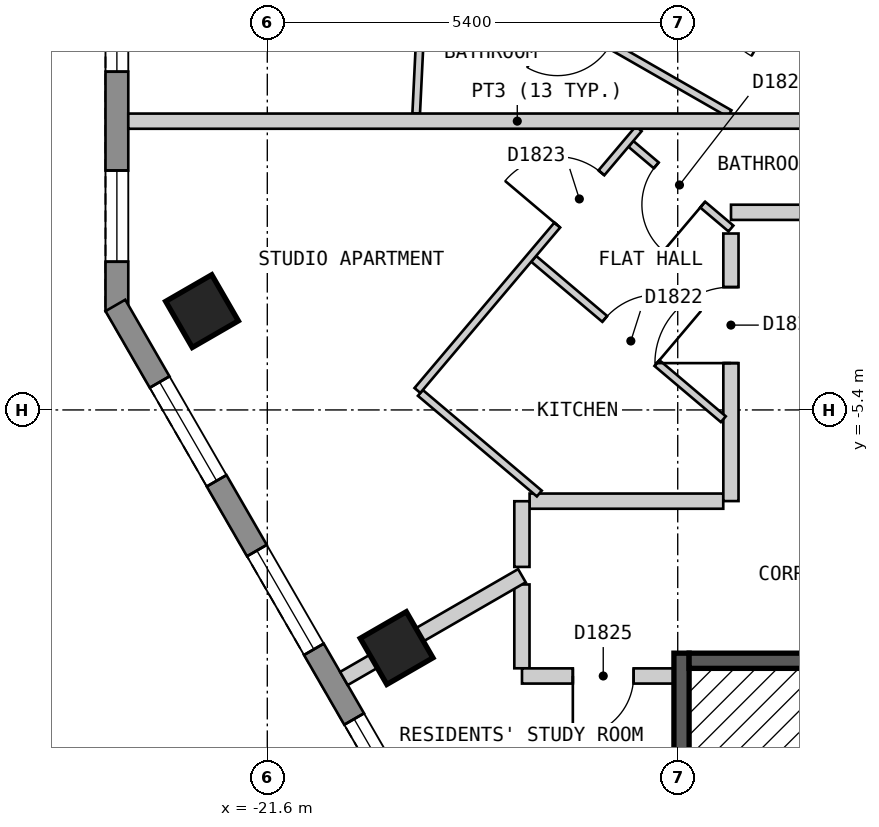
"""IFC4 building model, lengths in metres.
Left out: names, types, materials, properties, quantities, classifications, styles, units other than length and angle.
Written with IfcOpenShell. Run it as: python <this file> out.ifc"""

import sys

from ifc_helpers import new_model, si_unit, direction, frame, frame_2d, origin, origin_2d, place, context, subcontext, project, spatial, polyline, rectangle, outline, extrude, element, fill, save


model = new_model("IFC4")
c1 = context("Model", 3, precision=1e-05, world=origin(), true_north=direction((0.0, 1.0)))
c2 = subcontext(c1, "Body", "Model", "MODEL_VIEW")
j1 = project(units=[si_unit("LENGTHUNIT", "METRE"), si_unit("PLANEANGLEUNIT", "RADIAN")], contexts=[c1])
p1 = place(None, origin())
s1 = spatial("IfcSite", under=j1, at=p1, CompositionType="ELEMENT")
p2 = place(p1, origin())
s2 = spatial("IfcBuilding", under=s1, at=p2, CompositionType="ELEMENT")
p3 = place(p2, frame((0.0, 0.0, 208.8)))
s3 = spatial("IfcBuildingStorey", under=s2, at=p3, CompositionType="ELEMENT", Elevation=208.8)
for number, where, z_axis, x_axis in (
    (1, (-22.459, -4.1, 0.0), (0.0, 0.0, 1.0), (0.5, -0.866, 0.0)),
    (2, (-19.899, -8.533, 0.0), (0.0, 0.0, 1.0), (0.5, -0.866, 0.0)),
):
    element("IfcColumn", number, at=place(p3, frame(where, z_axis=z_axis, x_axis=x_axis)), inside=s3, PredefinedType="COLUMN", context=c2, shape_type="SweptSolid", body=[
        extrude(rectangle(XDim=0.7, YDim=0.7, at=origin_2d()), origin(), (0.0, 0.0, 1.0), 3.0),
    ])
p4 = place(p3, frame((-23.579, 0.9, 0.0), z_axis=(0.0, 0.0, 1.0), x_axis=(0.0, -1.0, 0.0)))
e3 = element("IfcWall", 3, at=p4, inside=s3, PredefinedType="SOLIDWALL", context=c2, shape_type="SweptSolid", body=[
    extrude(outline(polyline([(0.0, -0.15), (5.0, -0.15), (4.92, 0.15), (0.08, 0.15), (0.0, -0.15)])), origin(), (0.0, 0.0, 1.0), 2.7),
])
p5 = place(p4, frame((0.65, 0.0, 0.15)))
e4 = element("IfcOpeningElement", 4, at=p5, cuts=e3, PredefinedType="OPENING", context=c2, shape_type="SweptSolid", body=[
    extrude(rectangle(XDim=1.2, YDim=2.1, at=frame_2d((0.6, 1.05))), frame((0.0, 0.16, 0.0), z_axis=(0.0, -1.0, 0.0), x_axis=(1.0, 0.0, 0.0)), (0.0, 0.0, 1.0), 0.32),
])
p6 = place(p4, frame((3.15, 0.0, 0.15)))
e5 = element("IfcOpeningElement", 5, at=p6, cuts=e3, PredefinedType="OPENING", context=c2, shape_type="SweptSolid", body=[
    extrude(rectangle(XDim=1.2, YDim=2.1, at=frame_2d((0.6, 1.05))), frame((0.0, 0.16, 0.0), z_axis=(0.0, -1.0, 0.0), x_axis=(1.0, 0.0, 0.0)), (0.0, 0.0, 1.0), 0.32),
])
p7 = place(p3, frame((-23.599, -4.025, 0.0), z_axis=(0.0, 0.0, 1.0), x_axis=(0.500012653391, -0.866018098222, 0.0)))
e6 = element("IfcWall", 6, at=p7, inside=s3, PredefinedType="SOLIDWALL", context=c2, shape_type="SweptSolid", body=[
    extrude(outline(polyline([(0.0, -0.15), (16.628, -0.15), (16.548, 0.15), (0.08, 0.15), (0.0, -0.15)])), origin(), (0.0, 0.0, 1.0), 2.7),
])
p8 = place(p7, frame((1.164, 0.0, 0.15)))
e7 = element("IfcOpeningElement", 7, at=p8, cuts=e6, PredefinedType="OPENING", context=c2, shape_type="SweptSolid", body=[
    extrude(rectangle(XDim=1.5, YDim=2.1, at=frame_2d((0.75, 1.05))), frame((0.0, 0.16, 0.0), z_axis=(0.0, -1.0, 0.0), x_axis=(1.0, 0.0, 0.0)), (0.0, 0.0, 1.0), 0.32),
])
p9 = place(p7, frame((3.724, 0.0, 0.15)))
e8 = element("IfcOpeningElement", 8, at=p9, cuts=e6, PredefinedType="OPENING", context=c2, shape_type="SweptSolid", body=[
    extrude(rectangle(XDim=1.5, YDim=2.1, at=frame_2d((0.75, 1.05))), frame((0.0, 0.16, 0.0), z_axis=(0.0, -1.0, 0.0), x_axis=(1.0, 0.0, 0.0)), (0.0, 0.0, 1.0), 0.32),
])
p10 = place(p7, frame((6.283, 0.0, 0.15)))
e9 = element("IfcOpeningElement", 9, at=p10, cuts=e6, PredefinedType="OPENING", context=c2, shape_type="SweptSolid", body=[
    extrude(rectangle(XDim=1.5, YDim=2.1, at=frame_2d((0.75, 1.05))), frame((0.0, 0.16, 0.0), z_axis=(0.0, -1.0, 0.0), x_axis=(1.0, 0.0, 0.0)), (0.0, 0.0, 1.0), 0.32),
])
p11 = place(p7, frame((8.843, 0.0, 0.15)))
e10 = element("IfcOpeningElement", 10, at=p11, cuts=e6, PredefinedType="OPENING", context=c2, shape_type="SweptSolid", body=[
    extrude(rectangle(XDim=1.5, YDim=2.1, at=frame_2d((0.75, 1.05))), frame((0.0, 0.16, 0.0), z_axis=(0.0, -1.0, 0.0), x_axis=(1.0, 0.0, 0.0)), (0.0, 0.0, 1.0), 0.32),
])
p12 = place(p7, frame((11.403, 0.0, 0.15)))
e11 = element("IfcOpeningElement", 11, at=p12, cuts=e6, PredefinedType="OPENING", context=c2, shape_type="SweptSolid", body=[
    extrude(rectangle(XDim=1.5, YDim=2.1, at=frame_2d((0.75, 1.05))), frame((0.0, 0.16, 0.0), z_axis=(0.0, -1.0, 0.0), x_axis=(1.0, 0.0, 0.0)), (0.0, 0.0, 1.0), 0.32),
])
p13 = place(p7, frame((13.962, 0.0, 0.15)))
e12 = element("IfcOpeningElement", 12, at=p13, cuts=e6, PredefinedType="OPENING", context=c2, shape_type="SweptSolid", body=[
    extrude(rectangle(XDim=1.5, YDim=2.1, at=frame_2d((0.75, 1.05))), frame((0.0, 0.16, 0.0), z_axis=(0.0, -1.0, 0.0), x_axis=(1.0, 0.0, 0.0)), (0.0, 0.0, 1.0), 0.32),
])
p14 = place(p3, frame((-18.25, -7.696, 0.0), z_axis=(0.0, 0.0, 1.0), x_axis=(0.0, -1.0, 0.0)))
e13 = element("IfcWall", 13, at=p14, inside=s3, PredefinedType="PARTITIONING", context=c2, shape_type="SweptSolid", body=[
    extrude(rectangle(XDim=1.103, YDim=0.2, at=frame_2d((0.552, 0.0))), origin(), (0.0, 0.0, 1.0), 2.7),
])
p15 = place(p3, frame((-18.149, -6.6, 0.0), z_axis=(0.0, 0.0, 1.0), x_axis=(1.0, 0.0, 0.0)))
e14 = element("IfcWall", 14, at=p15, inside=s3, PredefinedType="PARTITIONING", context=c2, shape_type="SweptSolid", body=[
    extrude(rectangle(XDim=2.548, YDim=0.2, at=frame_2d((1.274, 0.0))), origin(), (0.0, 0.0, 1.0), 2.7),
])
p16 = place(p3, frame((-18.249, -8.9, 0.0), z_axis=(0.0, 0.0, 1.0), x_axis=(1.0, 0.0, 0.0)))
e15 = element("IfcWall", 15, at=p16, inside=s3, PredefinedType="PARTITIONING", context=c2, shape_type="SweptSolid", body=[
    extrude(rectangle(XDim=2.199, YDim=0.2, at=frame_2d((1.1, 0.0))), origin(), (0.0, 0.0, 1.0), 2.7),
])
p17 = place(p16, frame((0.669, 0.0, 0.0)))
e16 = element("IfcOpeningElement", 16, at=p17, cuts=e15, PredefinedType="OPENING", context=c2, shape_type="SweptSolid", body=[
    extrude(rectangle(XDim=0.8, YDim=2.1, at=frame_2d((0.4, 1.05))), frame((0.0, 0.11, 0.0), z_axis=(0.0, -1.0, 0.0), x_axis=(1.0, 0.0, 0.0)), (0.0, 0.0, 1.0), 0.22),
])
p18 = place(p3, frame((-15.499, -2.8, 0.0), z_axis=(0.0, 0.0, 1.0), x_axis=(1.0, 0.0, 0.0)))
e17 = element("IfcWall", 17, at=p18, inside=s3, PredefinedType="PARTITIONING", context=c2, shape_type="SweptSolid", body=[
    extrude(rectangle(XDim=2.025, YDim=0.2, at=frame_2d((1.012, 0.0))), origin(), (0.0, 0.0, 1.0), 2.7),
])
p19 = place(p3, frame((-15.5, -6.599, 0.0), z_axis=(0.0, 0.0, 1.0), x_axis=(0.0, 1.0, 0.0)))
e18 = element("IfcWall", 18, at=p19, inside=s3, PredefinedType="PARTITIONING", context=c2, shape_type="SweptSolid", body=[
    extrude(rectangle(XDim=3.52, YDim=0.2, at=frame_2d((1.76, 0.0))), origin(), (0.0, 0.0, 1.0), 2.7),
])
p20 = place(p19, frame((1.815, 0.0, 0.0)))
e19 = element("IfcOpeningElement", 19, at=p20, cuts=e18, PredefinedType="OPENING", context=c2, shape_type="SweptSolid", body=[
    extrude(rectangle(XDim=1.0, YDim=2.1, at=frame_2d((0.5, 1.05))), frame((0.0, 0.11, 0.0), z_axis=(0.0, -1.0, 0.0), x_axis=(1.0, 0.0, 0.0)), (0.0, 0.0, 1.0), 0.22),
])
p21 = place(p3, frame((-18.25, -7.465, 0.0), z_axis=(0.0, 0.0, 1.0), x_axis=(0.0, 1.0, 0.0)))
e20 = element("IfcWall", 20, at=p21, inside=s3, PredefinedType="PARTITIONING", context=c2, shape_type="SweptSolid", body=[
    extrude(rectangle(XDim=0.864, YDim=0.2, at=frame_2d((0.432, 0.0))), origin(), (0.0, 0.0, 1.0), 2.7),
])
p22 = place(p3, frame((-17.441, 1.562, 0.0), z_axis=(0.0, 0.0, 1.0), x_axis=(0.867419073464, -0.497578286293, 0.0)))
e21 = element("IfcWall", 21, at=p22, inside=s3, PredefinedType="PARTITIONING", context=c2, shape_type="SweptSolid", body=[
    extrude(rectangle(XDim=5.185, YDim=0.1, at=frame_2d((2.593, 0.0))), origin(), (0.0, 0.0, 1.0), 2.7),
])
p23 = place(p22, frame((2.165, 0.0, 0.0)))
e22 = element("IfcOpeningElement", 22, at=p23, cuts=e21, PredefinedType="OPENING", context=c2, shape_type="SweptSolid", body=[
    extrude(rectangle(XDim=0.9, YDim=2.1, at=frame_2d((0.45, 1.05))), frame((0.0, 0.06, 0.0), z_axis=(0.0, -1.0, 0.0), x_axis=(1.0, 0.0, 0.0)), (0.0, 0.0, 1.0), 0.12),
])
p24 = place(p3, frame((-19.48, 0.771, 0.0), z_axis=(0.0, 0.0, 1.0), x_axis=(0.86748552317, -0.497462427817, 0.0)))
e23 = element("IfcWall", 23, at=p24, inside=s3, PredefinedType="PARTITIONING", context=c2, shape_type="SweptSolid", body=[
    extrude(rectangle(XDim=4.567, YDim=0.1, at=frame_2d((2.284, 0.0))), origin(), (0.0, 0.0, 1.0), 2.7),
])
p25 = place(p24, frame((1.956, 0.0, 0.0)))
e24 = element("IfcOpeningElement", 24, at=p25, cuts=e23, PredefinedType="OPENING", context=c2, shape_type="SweptSolid", body=[
    extrude(rectangle(XDim=0.8, YDim=2.1, at=frame_2d((0.4, 1.05))), frame((0.0, 0.06, 0.0), z_axis=(0.0, -1.0, 0.0), x_axis=(1.0, 0.0, 0.0)), (0.0, 0.0, 1.0), 0.12),
])
p26 = place(p3, frame((-16.816, -1.9, 0.0), z_axis=(0.0, 0.0, 1.0), x_axis=(0.763509851459, -0.645796180482, 0.0)))
e25 = element("IfcWall", 25, at=p26, inside=s3, PredefinedType="PARTITIONING", context=c2, shape_type="SweptSolid", body=[
    extrude(rectangle(XDim=1.724, YDim=0.1, at=frame_2d((0.862, 0.0))), origin(), (0.0, 0.0, 1.0), 2.7),
])
p27 = place(p26, frame((0.437, 0.0, 0.0)))
e26 = element("IfcOpeningElement", 26, at=p27, cuts=e25, PredefinedType="OPENING", context=c2, shape_type="SweptSolid", body=[
    extrude(rectangle(XDim=0.8, YDim=2.1, at=frame_2d((0.4, 1.05))), frame((0.0, 0.06, 0.0), z_axis=(0.0, -1.0, 0.0), x_axis=(1.0, 0.0, 0.0)), (0.0, 0.0, 1.0), 0.12),
])
p28 = place(p3, frame((-18.095, -3.412, 0.0), z_axis=(0.0, 0.0, 1.0), x_axis=(0.763564811502, -0.645731196889, 0.0)))
e27 = element("IfcWall", 27, at=p28, inside=s3, PredefinedType="PARTITIONING", context=c2, shape_type="SweptSolid", body=[
    extrude(rectangle(XDim=3.267, YDim=0.1, at=frame_2d((1.634, 0.0))), origin(), (0.0, 0.0, 1.0), 2.7),
])
p29 = place(p28, frame((1.224, 0.0, 0.0)))
e28 = element("IfcOpeningElement", 28, at=p29, cuts=e27, PredefinedType="OPENING", context=c2, shape_type="SweptSolid", body=[
    extrude(rectangle(XDim=0.9, YDim=2.1, at=frame_2d((0.45, 1.05))), frame((0.0, 0.06, 0.0), z_axis=(0.0, -1.0, 0.0), x_axis=(1.0, 0.0, 0.0)), (0.0, 0.0, 1.0), 0.12),
])
p30 = place(p3, frame((-19.586, -5.176, 0.0), z_axis=(0.0, 0.0, 1.0), x_axis=(0.763435976882, -0.645883510551, 0.0)))
e29 = element("IfcWall", 29, at=p30, inside=s3, PredefinedType="PARTITIONING", context=c2, shape_type="SweptSolid", body=[
    extrude(rectangle(XDim=2.05, YDim=0.1, at=frame_2d((1.025, 0.0))), origin(), (0.0, 0.0, 1.0), 2.7),
])
p31 = place(p3, frame((-19.625, -5.144, 0.0), z_axis=(0.0, 0.0, 1.0), x_axis=(0.645668001073, 0.763618250431, 0.0)))
e30 = element("IfcWall", 30, at=p31, inside=s3, PredefinedType="PARTITIONING", context=c2, shape_type="SweptSolid", body=[
    extrude(rectangle(XDim=4.51, YDim=0.1, at=frame_2d((2.255, 0.0))), origin(), (0.0, 0.0, 1.0), 2.7),
])
p32 = place(p31, frame((2.85, 0.0, 0.0)))
e31 = element("IfcOpeningElement", 31, at=p32, cuts=e30, PredefinedType="OPENING", context=c2, shape_type="SweptSolid", body=[
    extrude(rectangle(XDim=0.9, YDim=2.1, at=frame_2d((0.45, 1.05))), frame((0.0, 0.06, 0.0), z_axis=(0.0, -1.0, 0.0), x_axis=(1.0, 0.0, 0.0)), (0.0, 0.0, 1.0), 0.12),
])
p33 = place(p3, frame((-19.641, -1.5, 0.0), z_axis=(0.0, 0.0, 1.0), x_axis=(0.048898906005, 0.998803732968, 0.0)))
e32 = element("IfcWall", 32, at=p33, inside=s3, PredefinedType="PARTITIONING", context=c2, shape_type="SweptSolid", body=[
    extrude(rectangle(XDim=2.661, YDim=0.1, at=frame_2d((1.331, 0.0))), origin(), (0.0, 0.0, 1.0), 2.7),
])
p34 = place(p3, frame((-23.429, -1.601, 0.0), z_axis=(0.0, 0.0, 1.0), x_axis=(0.999999995449, 9.5406191e-05, 0.0)))
e33 = element("IfcWall", 33, at=p34, inside=s3, PredefinedType="PARTITIONING", context=c2, shape_type="SweptSolid", body=[
    extrude(rectangle(XDim=10.236, YDim=0.2, at=frame_2d((5.118, 0.0))), origin(), (0.0, 0.0, 1.0), 2.7),
])
p35 = place(p3, frame((-20.592, -8.933, 0.0), z_axis=(0.0, 0.0, 1.0), x_axis=(0.866045775131, 0.499964714133, 0.0)))
e34 = element("IfcWall", 34, at=p35, inside=s3, PredefinedType="PARTITIONING", context=c2, shape_type="SweptSolid", body=[
    extrude(rectangle(XDim=2.704, YDim=0.2, at=frame_2d((1.352, 0.0))), origin(), (0.0, 0.0, 1.0), 2.7),
])
p36 = place(p3, frame((-16.15, -14.4, 0.0), z_axis=(0.0, 0.0, 1.0), x_axis=(0.0, 1.0, 0.0)))
e35 = element("IfcWall", 35, at=p36, inside=s3, PredefinedType="SOLIDWALL", context=c2, shape_type="SweptSolid", body=[
    extrude(rectangle(XDim=5.8, YDim=0.2, at=frame_2d((2.9, 0.0))), origin(), (0.0, 0.0, 1.0), 2.7),
])
p37 = place(p3, frame((-16.05, -8.7, 0.0), z_axis=(0.0, 0.0, 1.0), x_axis=(1.0, 0.0, 0.0)))
e36 = element("IfcWall", 36, at=p37, inside=s3, PredefinedType="SOLIDWALL", context=c2, shape_type="SweptSolid", body=[
    extrude(rectangle(XDim=2.75, YDim=0.2, at=frame_2d((1.375, 0.0))), origin(), (0.0, 0.0, 1.0), 2.7),
])
p38 = place(p5, origin())
e37 = element("IfcWindow", 37, at=p38, inside=s3, PartitioningType="SINGLE_PANEL", PredefinedType="WINDOW", context=c2, shape_type="SweptSolid", body=[
    extrude(rectangle(XDim=1.2, YDim=2.1, at=frame_2d((0.6, 1.05))), frame((0.0, 0.03, 0.0), z_axis=(0.0, -1.0, 0.0), x_axis=(1.0, 0.0, 0.0)), (0.0, 0.0, 1.0), 0.06),
])
fill(e4, e37)
p39 = place(p6, origin())
e38 = element("IfcWindow", 38, at=p39, inside=s3, PartitioningType="SINGLE_PANEL", PredefinedType="WINDOW", context=c2, shape_type="SweptSolid", body=[
    extrude(rectangle(XDim=1.2, YDim=2.1, at=frame_2d((0.6, 1.05))), frame((0.0, 0.03, 0.0), z_axis=(0.0, -1.0, 0.0), x_axis=(1.0, 0.0, 0.0)), (0.0, 0.0, 1.0), 0.06),
])
fill(e5, e38)
p40 = place(p8, origin())
e39 = element("IfcWindow", 39, at=p40, inside=s3, PartitioningType="SINGLE_PANEL", PredefinedType="WINDOW", context=c2, shape_type="SweptSolid", body=[
    extrude(rectangle(XDim=1.5, YDim=2.1, at=frame_2d((0.75, 1.05))), frame((0.0, 0.03, 0.0), z_axis=(0.0, -1.0, 0.0), x_axis=(1.0, 0.0, 0.0)), (0.0, 0.0, 1.0), 0.06),
])
fill(e7, e39)
p41 = place(p9, origin())
e40 = element("IfcWindow", 40, at=p41, inside=s3, PartitioningType="SINGLE_PANEL", PredefinedType="WINDOW", context=c2, shape_type="SweptSolid", body=[
    extrude(rectangle(XDim=1.5, YDim=2.1, at=frame_2d((0.75, 1.05))), frame((0.0, 0.03, 0.0), z_axis=(0.0, -1.0, 0.0), x_axis=(1.0, 0.0, 0.0)), (0.0, 0.0, 1.0), 0.06),
])
fill(e8, e40)
p42 = place(p10, origin())
e41 = element("IfcWindow", 41, at=p42, inside=s3, PartitioningType="SINGLE_PANEL", PredefinedType="WINDOW", context=c2, shape_type="SweptSolid", body=[
    extrude(rectangle(XDim=1.5, YDim=2.1, at=frame_2d((0.75, 1.05))), frame((0.0, 0.03, 0.0), z_axis=(0.0, -1.0, 0.0), x_axis=(1.0, 0.0, 0.0)), (0.0, 0.0, 1.0), 0.06),
])
fill(e9, e41)
p43 = place(p20, origin())
e42 = element("IfcDoor", 42, at=p43, inside=s3, OperationType="SINGLE_SWING_LEFT", PredefinedType="DOOR", context=c2, shape_type="SweptSolid", body=[
    extrude(rectangle(XDim=1.0, YDim=2.1, at=frame_2d((0.5, 1.05))), frame((0.0, 0.025, 0.0), z_axis=(0.0, -1.0, 0.0), x_axis=(1.0, 0.0, 0.0)), (0.0, 0.0, 1.0), 0.05),
])
fill(e19, e42)
p44 = place(p29, origin())
e43 = element("IfcDoor", 43, at=p44, inside=s3, OperationType="SINGLE_SWING_RIGHT", PredefinedType="DOOR", context=c2, shape_type="SweptSolid", body=[
    extrude(rectangle(XDim=0.9, YDim=2.1, at=frame_2d((0.45, 1.05))), frame((0.0, 0.025, 0.0), z_axis=(0.0, -1.0, 0.0), x_axis=(1.0, 0.0, 0.0)), (0.0, 0.0, 1.0), 0.05),
])
fill(e28, e43)
p45 = place(p32, origin())
e44 = element("IfcDoor", 44, at=p45, inside=s3, OperationType="SINGLE_SWING_LEFT", PredefinedType="DOOR", context=c2, shape_type="SweptSolid", body=[
    extrude(rectangle(XDim=0.9, YDim=2.1, at=frame_2d((0.45, 1.05))), frame((0.0, 0.025, 0.0), z_axis=(0.0, -1.0, 0.0), x_axis=(1.0, 0.0, 0.0)), (0.0, 0.0, 1.0), 0.05),
])
fill(e31, e44)
p46 = place(p27, origin())
e45 = element("IfcDoor", 45, at=p46, inside=s3, OperationType="SINGLE_SWING_RIGHT", PredefinedType="DOOR", context=c2, shape_type="SweptSolid", body=[
    extrude(rectangle(XDim=0.8, YDim=2.1, at=frame_2d((0.4, 1.05))), frame((0.0, 0.025, 0.0), z_axis=(0.0, -1.0, 0.0), x_axis=(1.0, 0.0, 0.0)), (0.0, 0.0, 1.0), 0.05),
])
fill(e26, e45)
p47 = place(p17, origin())
e46 = element("IfcDoor", 46, at=p47, inside=s3, OperationType="SINGLE_SWING_LEFT", PredefinedType="DOOR", context=c2, shape_type="SweptSolid", body=[
    extrude(rectangle(XDim=0.8, YDim=2.1, at=frame_2d((0.4, 1.05))), frame((0.0, 0.025, 0.0), z_axis=(0.0, -1.0, 0.0), x_axis=(1.0, 0.0, 0.0)), (0.0, 0.0, 1.0), 0.05),
])
fill(e16, e46)
save(model, sys.argv[1])
